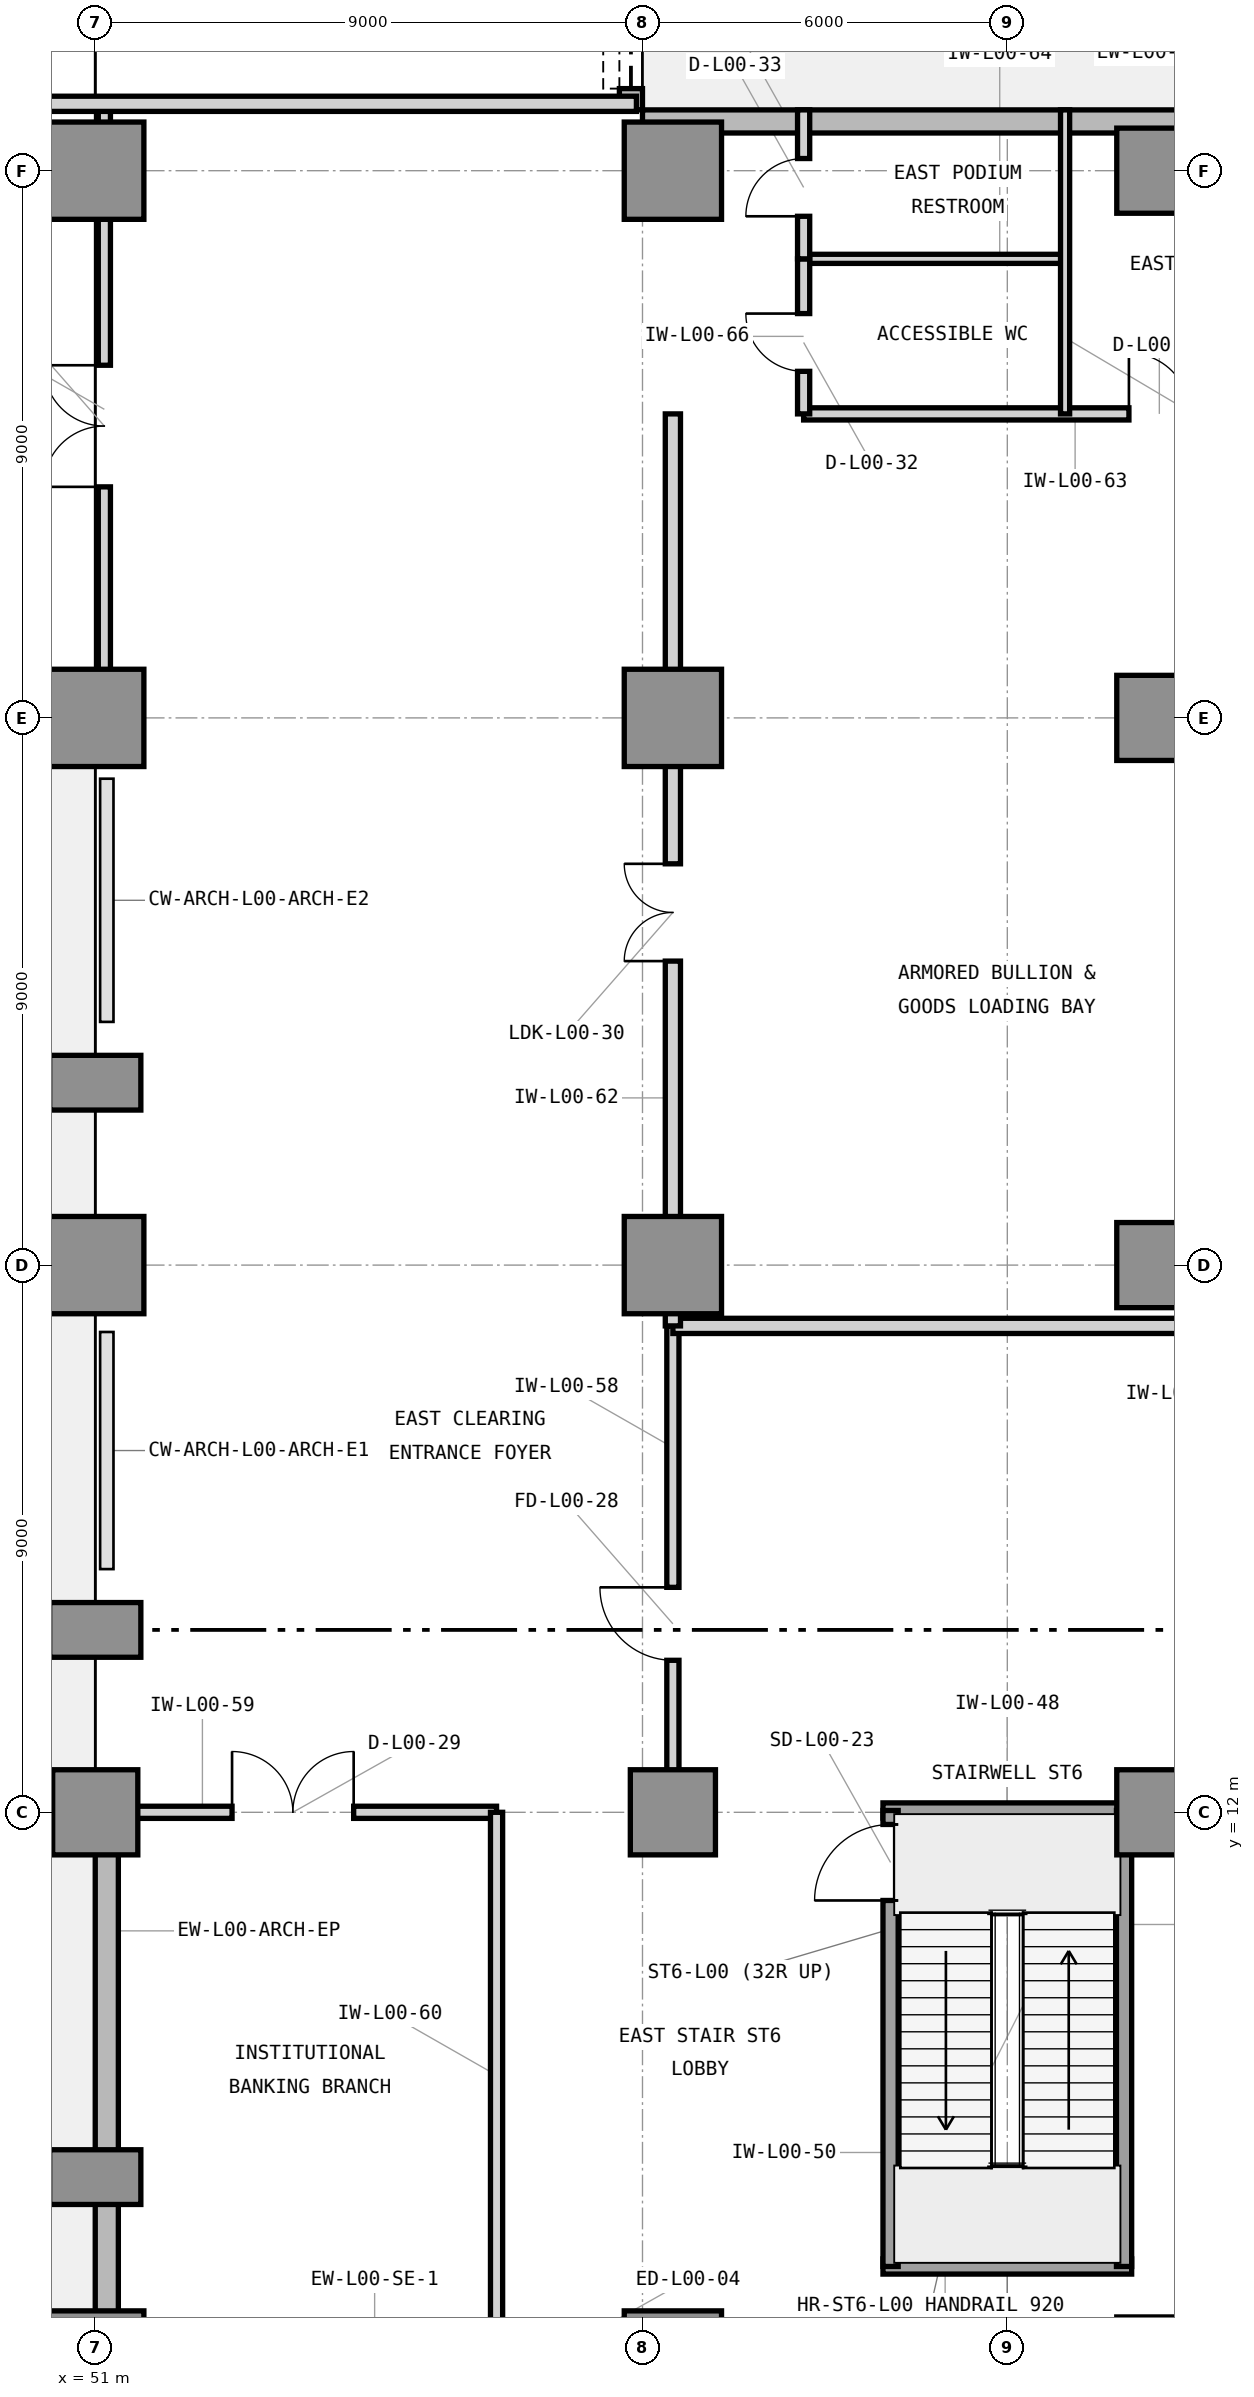
"""IFC4 building model, lengths in metres.
Left out: names, types, materials, properties, quantities, classifications, styles, units other than length and angle.
Written with IfcOpenShell. Run it as: python <this file> out.ifc"""

import sys

from ifc_helpers import new_model, si_unit, direction, frame, frame_2d, origin, origin_2d, place, context, subcontext, project, spatial, rectangle, extrude, element, fill, save


model = new_model("IFC4")
c1 = context("Model", 3, precision=1e-05, world=origin(), true_north=direction((0.0, 1.0)))
c2 = subcontext(c1, "Body", "Model", "MODEL_VIEW")
j1 = project(units=[si_unit("LENGTHUNIT", "METRE"), si_unit("PLANEANGLEUNIT", "RADIAN")], contexts=[c1])
p1 = place(None, origin())
s1 = spatial("IfcSite", under=j1, at=p1, CompositionType="ELEMENT")
p2 = place(p1, origin())
s2 = spatial("IfcBuilding", under=s1, at=p2, CompositionType="ELEMENT")
p3 = place(p2, origin())
s3 = spatial("IfcBuildingStorey", under=s2, at=p3, CompositionType="ELEMENT", Elevation=0.0)
p4 = place(p3, frame((51.0, 3.0, 0.0), z_axis=(0.0, 0.0, 1.0), x_axis=(1.0, 0.0, 0.0)))
e1 = element("IfcColumn", 1, at=p4, inside=s3, PredefinedType="COLUMN", context=c2, shape_type="SweptSolid", body=[
    extrude(rectangle(XDim=1.6, YDim=1.6, at=origin_2d()), origin(), (0.0, 0.0, 1.0), 5.4),
])
p5 = place(p3, frame((51.0, 12.0, 0.0), z_axis=(0.0, 0.0, 1.0), x_axis=(1.0, 0.0, 0.0)))
e2 = element("IfcColumn", 2, at=p5, inside=s3, PredefinedType="COLUMN", context=c2, shape_type="SweptSolid", body=[
    extrude(rectangle(XDim=1.4, YDim=1.4, at=origin_2d()), origin(), (0.0, 0.0, 1.0), 5.4),
])
for number, where, z_axis, x_axis in (
    (3, (51.0, 21.0, 0.0), (0.0, 0.0, 1.0), (1.0, 0.0, 0.0)),
    (4, (51.0, 30.0, 0.0), (0.0, 0.0, 1.0), (1.0, 0.0, 0.0)),
    (5, (51.0, 39.0, 0.0), (0.0, 0.0, 1.0), (1.0, 0.0, 0.0)),
    (6, (60.5, 3.0, 0.0), (0.0, 0.0, 1.0), (1.0, 0.0, 0.0)),
):
    element("IfcColumn", number, at=place(p3, frame(where, z_axis=z_axis, x_axis=x_axis)), inside=s3, PredefinedType="COLUMN", context=c2, shape_type="SweptSolid", body=[
        extrude(rectangle(XDim=1.6, YDim=1.6, at=origin_2d()), origin(), (0.0, 0.0, 1.0), 5.4),
    ])
p6 = place(p3, frame((60.5, 12.0, 0.0), z_axis=(0.0, 0.0, 1.0), x_axis=(1.0, 0.0, 0.0)))
e7 = element("IfcColumn", 7, at=p6, inside=s3, PredefinedType="COLUMN", context=c2, shape_type="SweptSolid", body=[
    extrude(rectangle(XDim=1.4, YDim=1.4, at=origin_2d()), origin(), (0.0, 0.0, 1.0), 5.4),
])
for number, where, z_axis, x_axis in (
    (8, (60.5, 21.0, 0.0), (0.0, 0.0, 1.0), (1.0, 0.0, 0.0)),
    (9, (60.5, 30.0, 0.0), (0.0, 0.0, 1.0), (1.0, 0.0, 0.0)),
    (10, (60.5, 39.0, 0.0), (0.0, 0.0, 1.0), (1.0, 0.0, 0.0)),
):
    element("IfcColumn", number, at=place(p3, frame(where, z_axis=z_axis, x_axis=x_axis)), inside=s3, PredefinedType="COLUMN", context=c2, shape_type="SweptSolid", body=[
        extrude(rectangle(XDim=1.6, YDim=1.6, at=origin_2d()), origin(), (0.0, 0.0, 1.0), 5.4),
    ])
for number, where, z_axis, x_axis in (
    (11, (68.5, 12.0, 0.0), (0.0, 0.0, 1.0), (1.0, 0.0, 0.0)),
    (12, (68.5, 21.0, 0.0), (0.0, 0.0, 1.0), (1.0, 0.0, 0.0)),
    (13, (68.5, 30.0, 0.0), (0.0, 0.0, 1.0), (1.0, 0.0, 0.0)),
    (14, (68.5, 39.0, 0.0), (0.0, 0.0, 1.0), (1.0, 0.0, 0.0)),
):
    element("IfcColumn", number, at=place(p3, frame(where, z_axis=z_axis, x_axis=x_axis)), inside=s3, PredefinedType="COLUMN", context=c2, shape_type="SweptSolid", body=[
        extrude(rectangle(XDim=1.4, YDim=1.4, at=origin_2d()), origin(), (0.0, 0.0, 1.0), 5.4),
    ])
for number, where, z_axis, x_axis in (
    (15, (51.0, 6.0, 0.0), (0.0, 0.0, 1.0), (1.0, 0.0, 0.0)),
    (16, (51.0, 15.0, 0.0), (0.0, 0.0, 1.0), (1.0, 0.0, 0.0)),
    (17, (51.0, 24.0, 0.0), (0.0, 0.0, 1.0), (1.0, 0.0, 0.0)),
):
    element("IfcColumn", number, at=place(p3, frame(where, z_axis=z_axis, x_axis=x_axis)), inside=s3, PredefinedType="PILASTER", context=c2, shape_type="SweptSolid", body=[
        extrude(rectangle(XDim=0.9, YDim=1.5, at=origin_2d()), origin(), (0.0, 0.0, 1.0), 5.4),
    ])
p7 = place(p3, frame((33.0, 30.19, 0.0), z_axis=(0.0, 0.0, 1.0), x_axis=(1.0, 0.0, 0.0)))
e18 = element("IfcWall", 18, at=p7, inside=s3, PredefinedType="STANDARD", context=c2, shape_type="SweptSolid", body=[
    extrude(rectangle(XDim=18.0, YDim=0.38, at=frame_2d((9.0, 0.0))), origin(), (0.0, 0.0, 1.0), 4.234),
])
p8 = place(p7, frame((3.2, 0.0, 0.0)))
e19 = element("IfcOpeningElement", 19, at=p8, cuts=e18, PredefinedType="OPENING", context=c2, shape_type="SweptSolid", body=[
    extrude(rectangle(XDim=2.4, YDim=2.8, at=frame_2d((1.2, 1.4))), frame((0.0, 0.2, 0.0), z_axis=(0.0, -1.0, 0.0), x_axis=(1.0, 0.0, 0.0)), (0.0, 0.0, 1.0), 0.4),
])
p9 = place(p3, frame((51.19, 3.0, 0.0), z_axis=(0.0, 0.0, 1.0), x_axis=(0.0, 1.0, 0.0)))
e20 = element("IfcWall", 20, at=p9, inside=s3, PredefinedType="STANDARD", context=c2, shape_type="SweptSolid", body=[
    extrude(rectangle(XDim=9.4, YDim=0.38, at=frame_2d((4.7, 0.0))), origin(), (0.0, 0.0, 1.0), 4.234),
])
p10 = place(p3, frame((72.0, 39.81, 0.0), z_axis=(0.0, 0.0, 1.0), x_axis=(-1.0, 0.0, 0.0)))
e21 = element("IfcWall", 21, at=p10, inside=s3, PredefinedType="STANDARD", context=c2, shape_type="SweptSolid", body=[
    extrude(rectangle(XDim=12.0, YDim=0.38, at=frame_2d((6.0, 0.0))), origin(), (0.0, 0.0, 1.0), 5.1),
])
p11 = place(p3, frame((59.81, 40.0, 0.0), z_axis=(0.0, 0.0, 1.0), x_axis=(0.0, 1.0, 0.0)))
e22 = element("IfcWall", 22, at=p11, inside=s3, PredefinedType="STANDARD", context=c2, shape_type="SweptSolid", body=[
    extrude(rectangle(XDim=11.0, YDim=0.38, at=frame_2d((5.5, 0.0))), origin(), (0.0, 0.0, 1.0), 5.1),
])
p12 = place(p11, frame((0.35, 0.0, 0.0)))
e23 = element("IfcOpeningElement", 23, at=p12, cuts=e22, PredefinedType="OPENING", context=c2, shape_type="SweptSolid", body=[
    extrude(rectangle(XDim=6.0, YDim=3.2, at=frame_2d((3.0, 1.6))), frame((0.0, 0.2, 0.0), z_axis=(0.0, -1.0, 0.0), x_axis=(1.0, 0.0, 0.0)), (0.0, 0.0, 1.0), 0.4),
])
for number, where, z_axis, x_axis in (
    (24, (63.955, 4.53, 0.0), (0.0, 0.0, 1.0), (1.0, 0.0, 0.0)),
    (25, (63.955, 12.03, 0.0), (0.0, 0.0, 1.0), (1.0, 0.0, 0.0)),
):
    element("IfcWall", number, at=place(p3, frame(where, z_axis=z_axis, x_axis=x_axis)), inside=s3, PredefinedType="SHEAR", context=c2, shape_type="SweptSolid", body=[
        extrude(rectangle(XDim=4.09, YDim=0.25, at=frame_2d((2.045, 0.0))), origin(), (0.0, 0.0, 1.0), 5.4),
    ])
p13 = place(p3, frame((67.92, 4.53, 0.0), z_axis=(0.0, 0.0, 1.0), x_axis=(0.0, 1.0, 0.0)))
e26 = element("IfcWall", 26, at=p13, inside=s3, PredefinedType="SHEAR", context=c2, shape_type="SweptSolid", body=[
    extrude(rectangle(XDim=7.5, YDim=0.25, at=frame_2d((3.75, 0.0))), origin(), (0.0, 0.0, 1.0), 5.4),
])
p14 = place(p3, frame((64.08, 4.53, 0.0), z_axis=(0.0, 0.0, 1.0), x_axis=(0.0, 1.0, 0.0)))
e27 = element("IfcWall", 27, at=p14, inside=s3, PredefinedType="SHEAR", context=c2, shape_type="SweptSolid", body=[
    extrude(rectangle(XDim=7.5, YDim=0.25, at=frame_2d((3.75, 0.0))), origin(), (0.0, 0.0, 1.0), 5.4),
])
p15 = place(p14, frame((6.02, 0.0, 0.0)))
e28 = element("IfcOpeningElement", 28, at=p15, cuts=e27, PredefinedType="OPENING", context=c2, shape_type="SweptSolid", body=[
    extrude(rectangle(XDim=1.25, YDim=2.2, at=frame_2d((0.625, 1.1))), frame((0.0, 0.135, 0.0), z_axis=(0.0, -1.0, 0.0), x_axis=(1.0, 0.0, 0.0)), (0.0, 0.0, 1.0), 0.27),
])
p16 = place(p3, frame((51.15, 30.0, 0.0), z_axis=(0.0, 0.0, 1.0), x_axis=(0.0, 1.0, 0.0)))
e29 = element("IfcWall", 29, at=p16, inside=s3, PredefinedType="PARTITIONING", context=c2, shape_type="SweptSolid", body=[
    extrude(rectangle(XDim=10.15, YDim=0.2, at=frame_2d((5.075, 0.0))), origin(), (0.0, 0.0, 1.0), 4.234),
])
p17 = place(p16, frame((3.8, 0.0, 0.0)))
e30 = element("IfcOpeningElement", 30, at=p17, cuts=e29, PredefinedType="OPENING", context=c2, shape_type="SweptSolid", body=[
    extrude(rectangle(XDim=2.0, YDim=2.5, at=frame_2d((1.0, 1.25))), frame((0.0, 0.11, 0.0), z_axis=(0.0, -1.0, 0.0), x_axis=(1.0, 0.0, 0.0)), (0.0, 0.0, 1.0), 0.22),
])
p18 = place(p3, frame((60.5, 12.0, 0.0), z_axis=(0.0, 0.0, 1.0), x_axis=(0.0, 1.0, 0.0)))
e31 = element("IfcWall", 31, at=p18, inside=s3, PredefinedType="PARTITIONING", context=c2, shape_type="SweptSolid", body=[
    extrude(rectangle(XDim=8.0, YDim=0.2, at=frame_2d((4.0, 0.0))), origin(), (0.0, 0.0, 1.0), 4.234),
])
p19 = place(p18, frame((2.5, 0.0, 0.0)))
e32 = element("IfcOpeningElement", 32, at=p19, cuts=e31, PredefinedType="OPENING", context=c2, shape_type="SweptSolid", body=[
    extrude(rectangle(XDim=1.2, YDim=2.2, at=frame_2d((0.6, 1.1))), frame((0.0, 0.11, 0.0), z_axis=(0.0, -1.0, 0.0), x_axis=(1.0, 0.0, 0.0)), (0.0, 0.0, 1.0), 0.22),
])
p20 = place(p3, frame((51.15, 12.0, 0.0), z_axis=(0.0, 0.0, 1.0), x_axis=(1.0, 0.0, 0.0)))
e33 = element("IfcWall", 33, at=p20, inside=s3, PredefinedType="PARTITIONING", context=c2, shape_type="SweptSolid", body=[
    extrude(rectangle(XDim=6.45, YDim=0.2, at=frame_2d((3.225, 0.0))), origin(), (0.0, 0.0, 1.0), 4.234),
])
p21 = place(p20, frame((2.1, 0.0, 0.0)))
e34 = element("IfcOpeningElement", 34, at=p21, cuts=e33, PredefinedType="OPENING", context=c2, shape_type="SweptSolid", body=[
    extrude(rectangle(XDim=2.0, YDim=2.5, at=frame_2d((1.0, 1.25))), frame((0.0, 0.11, 0.0), z_axis=(0.0, -1.0, 0.0), x_axis=(1.0, 0.0, 0.0)), (0.0, 0.0, 1.0), 0.22),
])
p22 = place(p3, frame((57.6, 3.35, 0.0), z_axis=(0.0, 0.0, 1.0), x_axis=(0.0, 1.0, 0.0)))
e35 = element("IfcWall", 35, at=p22, inside=s3, PredefinedType="PARTITIONING", context=c2, shape_type="SweptSolid", body=[
    extrude(rectangle(XDim=8.65, YDim=0.2, at=frame_2d((4.325, 0.0))), origin(), (0.0, 0.0, 1.0), 5.09),
])
p23 = place(p3, frame((60.5, 20.0, 0.0), z_axis=(0.0, 0.0, 1.0), x_axis=(1.0, 0.0, 0.0)))
e36 = element("IfcWall", 36, at=p23, inside=s3, PredefinedType="PARTITIONING", context=c2, shape_type="SweptSolid", body=[
    extrude(rectangle(XDim=11.08, YDim=0.25, at=frame_2d((5.54, 0.0))), origin(), (0.0, 0.0, 1.0), 5.09),
])
p24 = place(p3, frame((60.5, 20.0, 0.0), z_axis=(0.0, 0.0, 1.0), x_axis=(0.0, 1.0, 0.0)))
e37 = element("IfcWall", 37, at=p24, inside=s3, PredefinedType="PARTITIONING", context=c2, shape_type="SweptSolid", body=[
    extrude(rectangle(XDim=15.0, YDim=0.25, at=frame_2d((7.5, 0.0))), origin(), (0.0, 0.0, 1.0), 4.234),
])
p25 = place(p24, frame((6.0, 0.0, 0.0)))
e38 = element("IfcOpeningElement", 38, at=p25, cuts=e37, PredefinedType="OPENING", context=c2, shape_type="SweptSolid", body=[
    extrude(rectangle(XDim=1.6, YDim=2.3, at=frame_2d((0.8, 1.15))), frame((0.0, 0.135, 0.0), z_axis=(0.0, -1.0, 0.0), x_axis=(1.0, 0.0, 0.0)), (0.0, 0.0, 1.0), 0.27),
])
p26 = place(p3, frame((62.65, 35.0, 0.0), z_axis=(0.0, 0.0, 1.0), x_axis=(1.0, 0.0, 0.0)))
e39 = element("IfcWall", 39, at=p26, inside=s3, PredefinedType="PARTITIONING", context=c2, shape_type="SweptSolid", body=[
    extrude(rectangle(XDim=8.93, YDim=0.2, at=frame_2d((4.465, 0.0))), origin(), (0.0, 0.0, 1.0), 5.09),
])
p27 = place(p26, frame((5.35, 0.0, 0.0)))
e40 = element("IfcOpeningElement", 40, at=p27, cuts=e39, PredefinedType="OPENING", context=c2, shape_type="SweptSolid", body=[
    extrude(rectangle(XDim=1.0, YDim=2.15, at=frame_2d((0.5, 1.075))), frame((0.0, 0.11, 0.0), z_axis=(0.0, -1.0, 0.0), x_axis=(1.0, 0.0, 0.0)), (0.0, 0.0, 1.0), 0.22),
])
p28 = place(p3, frame((62.65, 37.55, 0.0), z_axis=(0.0, 0.0, 1.0), x_axis=(1.0, 0.0, 0.0)))
e41 = element("IfcWall", 41, at=p28, inside=s3, PredefinedType="PARTITIONING", context=c2, shape_type="SweptSolid", body=[
    extrude(rectangle(XDim=4.3, YDim=0.15, at=frame_2d((2.15, 0.0))), origin(), (0.0, 0.0, 1.0), 5.09),
])
p29 = place(p3, frame((66.95, 35.0, 0.0), z_axis=(0.0, 0.0, 1.0), x_axis=(0.0, 1.0, 0.0)))
e42 = element("IfcWall", 42, at=p29, inside=s3, PredefinedType="PARTITIONING", context=c2, shape_type="SweptSolid", body=[
    extrude(rectangle(XDim=5.0, YDim=0.15, at=frame_2d((2.5, 0.0))), origin(), (0.0, 0.0, 1.0), 5.09),
])
p30 = place(p3, frame((62.65, 35.0, 0.0), z_axis=(0.0, 0.0, 1.0), x_axis=(0.0, 1.0, 0.0)))
e43 = element("IfcWall", 43, at=p30, inside=s3, PredefinedType="PARTITIONING", context=c2, shape_type="SweptSolid", body=[
    extrude(rectangle(XDim=2.55, YDim=0.2, at=frame_2d((1.275, 0.0))), origin(), (0.0, 0.0, 1.0), 5.09),
])
p31 = place(p30, frame((0.7, 0.0, 0.0)))
e44 = element("IfcOpeningElement", 44, at=p31, cuts=e43, PredefinedType="OPENING", context=c2, shape_type="SweptSolid", body=[
    extrude(rectangle(XDim=0.95, YDim=2.1, at=frame_2d((0.475, 1.05))), frame((0.0, 0.11, 0.0), z_axis=(0.0, -1.0, 0.0), x_axis=(1.0, 0.0, 0.0)), (0.0, 0.0, 1.0), 0.22),
])
p32 = place(p3, frame((62.65, 37.55, 0.0), z_axis=(0.0, 0.0, 1.0), x_axis=(0.0, 1.0, 0.0)))
e45 = element("IfcWall", 45, at=p32, inside=s3, PredefinedType="PARTITIONING", context=c2, shape_type="SweptSolid", body=[
    extrude(rectangle(XDim=2.45, YDim=0.2, at=frame_2d((1.225, 0.0))), origin(), (0.0, 0.0, 1.0), 5.09),
])
p33 = place(p32, frame((0.7, 0.0, 0.0)))
e46 = element("IfcOpeningElement", 46, at=p33, cuts=e45, PredefinedType="OPENING", context=c2, shape_type="SweptSolid", body=[
    extrude(rectangle(XDim=0.95, YDim=2.1, at=frame_2d((0.475, 1.05))), frame((0.0, 0.11, 0.0), z_axis=(0.0, -1.0, 0.0), x_axis=(1.0, 0.0, 0.0)), (0.0, 0.0, 1.0), 0.22),
])
p34 = place(p3, frame((28.65, 40.1, 0.0), z_axis=(0.0, 0.0, 1.0), x_axis=(1.0, 0.0, 0.0)))
e47 = element("IfcWall", 47, at=p34, inside=s3, PredefinedType="PARTITIONING", context=c2, shape_type="SweptSolid", body=[
    extrude(rectangle(XDim=31.25, YDim=0.25, at=frame_2d((15.625, 0.0))), origin(), (0.0, 0.0, 1.0), 5.09),
])
p35 = place(p34, frame((6.0, 0.0, 0.0)))
e48 = element("IfcOpeningElement", 48, at=p35, cuts=e47, PredefinedType="OPENING", context=c2, shape_type="SweptSolid", body=[
    extrude(rectangle(XDim=1.2, YDim=2.2, at=frame_2d((0.6, 1.1))), frame((0.0, 0.135, 0.0), z_axis=(0.0, -1.0, 0.0), x_axis=(1.0, 0.0, 0.0)), (0.0, 0.0, 1.0), 0.27),
])
p36 = place(p12, frame((6.0, 0.0, 0.0), z_axis=(0.0, 0.0, 1.0), x_axis=(-1.0, 0.0, 0.0)))
e49 = element("IfcDoor", 49, at=p36, inside=s3, OperationType="ROLLINGUP", PredefinedType="DOOR", context=c2, shape_type="SweptSolid", body=[
    extrude(rectangle(XDim=6.0, YDim=3.2, at=frame_2d((3.0, 1.6))), frame((0.0, 0.025, 0.0), z_axis=(0.0, -1.0, 0.0), x_axis=(1.0, 0.0, 0.0)), (0.0, 0.0, 1.0), 0.05),
])
fill(e23, e49)
p37 = place(p15, origin())
e50 = element("IfcDoor", 50, at=p37, inside=s3, OperationType="SINGLE_SWING_LEFT", PredefinedType="DOOR", context=c2, shape_type="SweptSolid", body=[
    extrude(rectangle(XDim=1.25, YDim=2.2, at=frame_2d((0.625, 1.1))), frame((0.0, 0.025, 0.0), z_axis=(0.0, -1.0, 0.0), x_axis=(1.0, 0.0, 0.0)), (0.0, 0.0, 1.0), 0.05),
])
fill(e28, e50)
p38 = place(p17, origin())
e51 = element("IfcDoor", 51, at=p38, inside=s3, OperationType="DOUBLE_DOOR_SINGLE_SWING", PredefinedType="DOOR", context=c2, shape_type="SweptSolid", body=[
    extrude(rectangle(XDim=2.0, YDim=2.5, at=frame_2d((1.0, 1.25))), frame((0.0, 0.025, 0.0), z_axis=(0.0, -1.0, 0.0), x_axis=(1.0, 0.0, 0.0)), (0.0, 0.0, 1.0), 0.05),
])
fill(e30, e51)
p39 = place(p19, origin())
e52 = element("IfcDoor", 52, at=p39, inside=s3, OperationType="SINGLE_SWING_RIGHT", PredefinedType="DOOR", context=c2, shape_type="SweptSolid", body=[
    extrude(rectangle(XDim=1.2, YDim=2.2, at=frame_2d((0.6, 1.1))), frame((0.0, 0.025, 0.0), z_axis=(0.0, -1.0, 0.0), x_axis=(1.0, 0.0, 0.0)), (0.0, 0.0, 1.0), 0.05),
])
fill(e32, e52)
p40 = place(p21, origin())
e53 = element("IfcDoor", 53, at=p40, inside=s3, OperationType="DOUBLE_DOOR_SINGLE_SWING", PredefinedType="DOOR", context=c2, shape_type="SweptSolid", body=[
    extrude(rectangle(XDim=2.0, YDim=2.5, at=frame_2d((1.0, 1.25))), frame((0.0, 0.025, 0.0), z_axis=(0.0, -1.0, 0.0), x_axis=(1.0, 0.0, 0.0)), (0.0, 0.0, 1.0), 0.05),
])
fill(e34, e53)
p41 = place(p25, origin())
e54 = element("IfcDoor", 54, at=p41, inside=s3, OperationType="DOUBLE_DOOR_SINGLE_SWING", PredefinedType="DOOR", context=c2, shape_type="SweptSolid", body=[
    extrude(rectangle(XDim=1.6, YDim=2.3, at=frame_2d((0.8, 1.15))), frame((0.0, 0.025, 0.0), z_axis=(0.0, -1.0, 0.0), x_axis=(1.0, 0.0, 0.0)), (0.0, 0.0, 1.0), 0.05),
])
fill(e38, e54)
p42 = place(p27, origin())
e55 = element("IfcDoor", 55, at=p42, inside=s3, OperationType="SINGLE_SWING_LEFT", PredefinedType="DOOR", context=c2, shape_type="SweptSolid", body=[
    extrude(rectangle(XDim=1.0, YDim=2.15, at=frame_2d((0.5, 1.075))), frame((0.0, 0.025, 0.0), z_axis=(0.0, -1.0, 0.0), x_axis=(1.0, 0.0, 0.0)), (0.0, 0.0, 1.0), 0.05),
])
fill(e40, e55)
p43 = place(p31, origin())
e56 = element("IfcDoor", 56, at=p43, inside=s3, OperationType="SINGLE_SWING_RIGHT", PredefinedType="DOOR", context=c2, shape_type="SweptSolid", body=[
    extrude(rectangle(XDim=0.95, YDim=2.1, at=frame_2d((0.475, 1.05))), frame((0.0, 0.025, 0.0), z_axis=(0.0, -1.0, 0.0), x_axis=(1.0, 0.0, 0.0)), (0.0, 0.0, 1.0), 0.05),
])
fill(e44, e56)
p44 = place(p33, origin())
e57 = element("IfcDoor", 57, at=p44, inside=s3, OperationType="SINGLE_SWING_LEFT", PredefinedType="DOOR", context=c2, shape_type="SweptSolid", body=[
    extrude(rectangle(XDim=0.95, YDim=2.1, at=frame_2d((0.475, 1.05))), frame((0.0, 0.025, 0.0), z_axis=(0.0, -1.0, 0.0), x_axis=(1.0, 0.0, 0.0)), (0.0, 0.0, 1.0), 0.05),
])
fill(e46, e57)
save(model, sys.argv[1])
